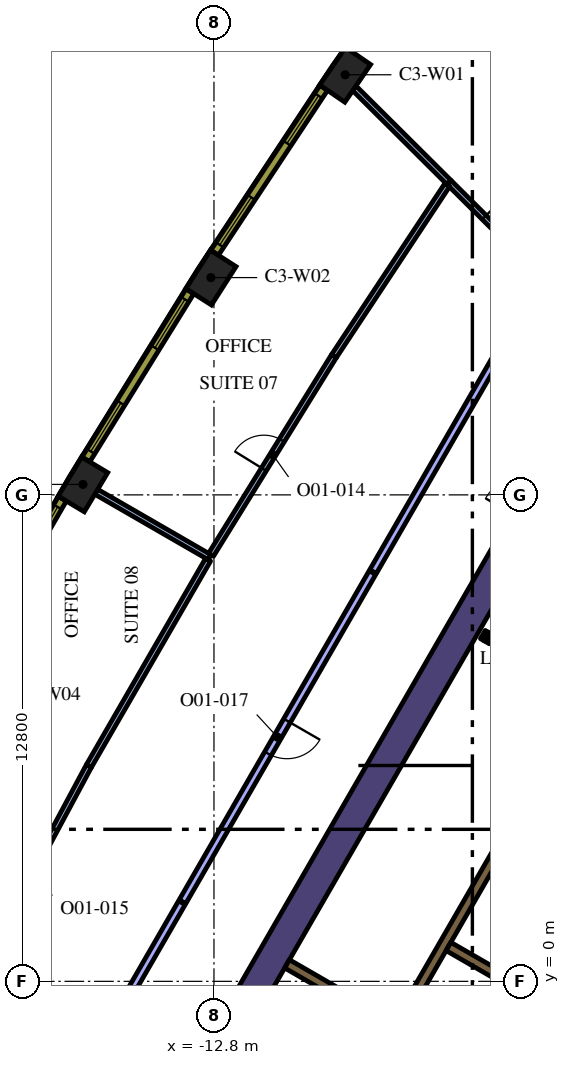
"""IFC4 building model, lengths in metres.
Left out: names, types, materials, properties, quantities, classifications, styles, units other than length and angle.
Written with IfcOpenShell. Run it as: python <this file> out.ifc"""

import sys

from ifc_helpers import new_model, si_unit, direction, frame, frame_2d, origin, origin_2d, place, context, subcontext, project, spatial, polyline, rectangle, outline, extrude, element, fill, save


model = new_model("IFC4")
c1 = context("Model", 3, precision=1e-05, world=origin(), true_north=direction((0.0, 1.0)))
c2 = subcontext(c1, "Body", "Model", "MODEL_VIEW")
j1 = project(units=[si_unit("LENGTHUNIT", "METRE"), si_unit("PLANEANGLEUNIT", "RADIAN")], contexts=[c1])
p1 = place(None, origin())
s1 = spatial("IfcSite", under=j1, at=p1, CompositionType="ELEMENT")
p2 = place(p1, origin())
s2 = spatial("IfcBuilding", under=s1, at=p2, CompositionType="ELEMENT")
p3 = place(p2, frame((0.0, 0.0, 141.6)))
s3 = spatial("IfcBuildingStorey", under=s2, at=p3, CompositionType="ELEMENT", Elevation=141.6)
for number, where, z_axis, x_axis in (
    (1, (-9.348, 23.854, 0.0), (0.0, 0.0, 1.0), (-0.565, -0.825, 0.0)),
    (2, (-12.88, 18.517, 0.0), (0.0, 0.0, 1.0), (-0.539, -0.842, 0.0)),
    (3, (-16.247, 13.075, 0.0), (0.0, 0.0, 1.0), (-0.513, -0.858, 0.0)),
):
    element("IfcColumn", number, at=place(p3, frame(where, z_axis=z_axis, x_axis=x_axis)), inside=s3, PredefinedType="COLUMN", context=c2, shape_type="SweptSolid", body=[
        extrude(rectangle(XDim=1.2, YDim=0.8, at=origin_2d()), origin(), (0.0, 0.0, 1.0), 4.2),
    ])
p4 = place(p3, frame((-12.668, -1.842, 0.0), z_axis=(0.0, 0.0, 1.0), x_axis=(0.500003640647, 0.866023301845, 0.0)))
e4 = element("IfcWall", 4, at=p4, inside=s3, PredefinedType="SOLIDWALL", context=c2, shape_type="SweptSolid", body=[
    extrude(rectangle(XDim=15.858, YDim=0.8, at=frame_2d((7.929, 0.0))), origin(), (0.0, 0.0, 1.0), 4.2),
])
p5 = place(p3, frame((-8.06, -1.311, 0.0), z_axis=(0.0, 0.0, 1.0), x_axis=(0.50000273126, 0.866023826885, 0.0)))
e5 = element("IfcWall", 5, at=p5, inside=s3, PredefinedType="SOLIDWALL", context=c2, shape_type="SweptSolid", body=[
    extrude(rectangle(XDim=10.33, YDim=0.25, at=frame_2d((5.165, 0.0))), origin(), (0.0, 0.0, 1.0), 4.2),
])
p6 = place(p3, frame((-4.724, -0.182, 0.0), z_axis=(0.0, 0.0, 1.0), x_axis=(-0.866008176907, 0.50002983664, 0.0)))
e6 = element("IfcWall", 6, at=p6, inside=s3, PredefinedType="SOLIDWALL", context=c2, shape_type="SweptSolid", body=[
    extrude(rectangle(XDim=2.2, YDim=0.25, at=frame_2d((1.1, 0.0))), origin(), (0.0, 0.0, 1.0), 4.2),
])
p7 = place(p3, frame((-8.106, -1.14, 0.0), z_axis=(0.0, 0.0, 1.0), x_axis=(-0.866008981251, 0.500028443584, 0.0)))
e7 = element("IfcWall", 7, at=p7, inside=s3, PredefinedType="SOLIDWALL", context=c2, shape_type="SweptSolid", body=[
    extrude(rectangle(XDim=3.2, YDim=0.25, at=frame_2d((1.6, 0.0))), origin(), (0.0, 0.0, 1.0), 4.2),
])
p8 = place(p3, frame((-5.725, 9.125, 0.0), z_axis=(0.0, 0.0, 1.0), x_axis=(0.866185586049, -0.49972245349, 0.0)))
e8 = element("IfcWall", 8, at=p8, inside=s3, PredefinedType="SOLIDWALL", context=c2, shape_type="SweptSolid", body=[
    extrude(rectangle(XDim=0.11, YDim=0.25, at=frame_2d((0.055, 0.0))), origin(), (0.0, 0.0, 1.0), 4.2),
])
p9 = place(p3, origin())
e9 = element("IfcWall", 9, at=p9, inside=s3, PredefinedType="SOLIDWALL", context=c2, shape_type="SweptSolid", body=[
    extrude(outline(polyline([(-5.689, 8.96), (-5.69, 8.961), (-5.565, 9.177), (-5.319, 9.035), (-5.335, 9.026), (-5.351, 9.015), (-5.366, 9.002), (-5.379, 8.988), (-5.392, 8.972), (-5.402, 8.956), (-5.412, 8.939), (-5.629, 9.064), (-5.629, 9.064), (-5.689, 8.96)])), origin(), (0.0, 0.0, 1.0), 4.2),
])
p10 = place(p3, frame((-0.898, 6.194, 0.0), z_axis=(0.0, 0.0, 1.0), x_axis=(-0.499996202215, -0.866027596426, 0.0)))
e10 = element("IfcWall", 10, at=p10, inside=s3, PredefinedType="SOLIDWALL", context=c2, shape_type="SweptSolid", body=[
    extrude(rectangle(XDim=9.83, YDim=0.25, at=frame_2d((4.915, 0.0))), origin(), (0.0, 0.0, 1.0), 4.2),
])
p11 = place(p10, frame((0.585, 0.0, 0.0)))
e11 = element("IfcOpeningElement", 11, at=p11, cuts=e10, PredefinedType="OPENING", context=c2, shape_type="SweptSolid", body=[
    extrude(rectangle(XDim=1.1, YDim=2.1, at=frame_2d((0.55, 1.05))), frame((0.0, 0.135, 0.0), z_axis=(0.0, -1.0, 0.0), x_axis=(1.0, 0.0, 0.0)), (0.0, 0.0, 1.0), 0.27),
])
p12 = place(p10, frame((3.105, 0.0, 0.0)))
e12 = element("IfcOpeningElement", 12, at=p12, cuts=e10, PredefinedType="OPENING", context=c2, shape_type="SweptSolid", body=[
    extrude(rectangle(XDim=1.1, YDim=2.1, at=frame_2d((0.55, 1.05))), frame((0.0, 0.135, 0.0), z_axis=(0.0, -1.0, 0.0), x_axis=(1.0, 0.0, 0.0)), (0.0, 0.0, 1.0), 0.27),
])
p13 = place(p10, frame((5.625, 0.0, 0.0)))
e13 = element("IfcOpeningElement", 13, at=p13, cuts=e10, PredefinedType="OPENING", context=c2, shape_type="SweptSolid", body=[
    extrude(rectangle(XDim=1.1, YDim=2.1, at=frame_2d((0.55, 1.05))), frame((0.0, 0.135, 0.0), z_axis=(0.0, -1.0, 0.0), x_axis=(1.0, 0.0, 0.0)), (0.0, 0.0, 1.0), 0.27),
])
p14 = place(p10, frame((8.145, 0.0, 0.0)))
e14 = element("IfcOpeningElement", 14, at=p14, cuts=e10, PredefinedType="OPENING", context=c2, shape_type="SweptSolid", body=[
    extrude(rectangle(XDim=1.1, YDim=2.1, at=frame_2d((0.55, 1.05))), frame((0.0, 0.135, 0.0), z_axis=(0.0, -1.0, 0.0), x_axis=(1.0, 0.0, 0.0)), (0.0, 0.0, 1.0), 0.27),
])
p15 = place(p3, frame((-5.659, 9.012, 0.0), z_axis=(0.0, 0.0, 1.0), x_axis=(0.866009402589, -0.500027713859, 0.0)))
e15 = element("IfcWall", 15, at=p15, inside=s3, PredefinedType="PARTITIONING", context=c2, shape_type="SweptSolid", body=[
    extrude(rectangle(XDim=2.1, YDim=0.12, at=frame_2d((1.05, 0.0))), origin(), (0.0, 0.0, 1.0), 3.15),
])
p16 = place(p15, frame((0.45, 0.0, 0.0)))
e16 = element("IfcOpeningElement", 16, at=p16, cuts=e15, PredefinedType="OPENING", context=c2, shape_type="SweptSolid", body=[
    extrude(rectangle(XDim=1.2, YDim=2.1, at=frame_2d((0.6, 1.05))), frame((0.0, 0.07, 0.0), z_axis=(0.0, -1.0, 0.0), x_axis=(1.0, 0.0, 0.0)), (0.0, 0.0, 1.0), 0.14),
])
p17 = place(p3, frame((-6.613, 21.021, 0.0), z_axis=(0.0, 0.0, 1.0), x_axis=(-0.709222036241, 0.704985179497, 0.0)))
e17 = element("IfcWall", 17, at=p17, inside=s3, PredefinedType="PARTITIONING", context=c2, shape_type="SweptSolid", body=[
    extrude(rectangle(XDim=3.515, YDim=0.15, at=frame_2d((1.757, 0.0))), origin(), (0.0, 0.0, 1.0), 3.15),
])
p18 = place(p3, frame((-6.619, 21.027, 0.0), z_axis=(0.0, 0.0, 1.0), x_axis=(0.709188943058, -0.705018470002, 0.0)))
e18 = element("IfcWall", 18, at=p18, inside=s3, PredefinedType="PARTITIONING", context=c2, shape_type="SweptSolid", body=[
    extrude(rectangle(XDim=3.512, YDim=0.15, at=frame_2d((1.756, 0.0))), origin(), (0.0, 0.0, 1.0), 3.15),
])
p19 = place(p18, frame((1.312, 0.0, 0.0)))
e19 = element("IfcOpeningElement", 19, at=p19, cuts=e18, PredefinedType="OPENING", context=c2, shape_type="SweptSolid", body=[
    extrude(rectangle(XDim=0.9, YDim=2.1, at=frame_2d((0.45, 1.05))), frame((0.0, 0.085, 0.0), z_axis=(0.0, -1.0, 0.0), x_axis=(1.0, 0.0, 0.0)), (0.0, 0.0, 1.0), 0.17),
])
p20 = place(p3, frame((-12.917, 11.16, 0.0), z_axis=(0.0, 0.0, 1.0), x_axis=(-0.866039125629, 0.499976232315, 0.0)))
e20 = element("IfcWall", 20, at=p20, inside=s3, PredefinedType="PARTITIONING", context=c2, shape_type="SweptSolid", body=[
    extrude(rectangle(XDim=3.442, YDim=0.15, at=frame_2d((1.721, 0.0))), origin(), (0.0, 0.0, 1.0), 3.15),
])
p21 = place(p3, frame((-6.658, 20.96, 0.0), z_axis=(0.0, 0.0, 1.0), x_axis=(-0.551907039463, -0.833905642019, 0.0)))
e21 = element("IfcWall", 21, at=p21, inside=s3, PredefinedType="PARTITIONING", context=c2, shape_type="SweptSolid", body=[
    extrude(rectangle(XDim=5.412, YDim=0.15, at=frame_2d((2.706, 0.0))), origin(), (0.0, 0.0, 1.0), 3.15),
])
p22 = place(p3, frame((-12.877, 11.224, 0.0), z_axis=(0.0, 0.0, 1.0), x_axis=(0.526202711334, 0.850359163286, 0.0)))
e22 = element("IfcWall", 22, at=p22, inside=s3, PredefinedType="PARTITIONING", context=c2, shape_type="SweptSolid", body=[
    extrude(rectangle(XDim=6.142, YDim=0.15, at=frame_2d((3.071, 0.0))), origin(), (0.0, 0.0, 1.0), 3.15),
])
p23 = place(p22, frame((2.642, 0.0, 0.0)))
e23 = element("IfcOpeningElement", 23, at=p23, cuts=e22, PredefinedType="OPENING", context=c2, shape_type="SweptSolid", body=[
    extrude(rectangle(XDim=0.9, YDim=2.1, at=frame_2d((0.45, 1.05))), frame((0.0, 0.085, 0.0), z_axis=(0.0, -1.0, 0.0), x_axis=(1.0, 0.0, 0.0)), (0.0, 0.0, 1.0), 0.17),
])
p24 = place(p3, frame((-12.954, 11.095, 0.0), z_axis=(0.0, 0.0, 1.0), x_axis=(-0.500282785331, -0.865862076027, 0.0)))
e24 = element("IfcWall", 24, at=p24, inside=s3, PredefinedType="PARTITIONING", context=c2, shape_type="SweptSolid", body=[
    extrude(rectangle(XDim=6.273, YDim=0.15, at=frame_2d((3.136, 0.0))), origin(), (0.0, 0.0, 1.0), 3.15),
])
p25 = place(p3, frame((-19.118, 0.02, 0.0), z_axis=(0.0, 0.0, 1.0), x_axis=(0.47251230182, 0.88132407469, 0.0)))
e25 = element("IfcWall", 25, at=p25, inside=s3, PredefinedType="PARTITIONING", context=c2, shape_type="SweptSolid", body=[
    extrude(rectangle(XDim=6.404, YDim=0.15, at=frame_2d((3.202, 0.0))), origin(), (0.0, 0.0, 1.0), 3.15),
])
p26 = place(p25, frame((2.704, 0.0, 0.0)))
e26 = element("IfcOpeningElement", 26, at=p26, cuts=e25, PredefinedType="OPENING", context=c2, shape_type="SweptSolid", body=[
    extrude(rectangle(XDim=0.9, YDim=2.1, at=frame_2d((0.45, 1.05))), frame((0.0, 0.085, 0.0), z_axis=(0.0, -1.0, 0.0), x_axis=(1.0, 0.0, 0.0)), (0.0, 0.0, 1.0), 0.17),
])
p27 = place(p3, frame((-8.628, 10.755, 0.0), z_axis=(0.0, 0.0, 1.0), x_axis=(-0.500004234368, -0.866022959057, 0.0)))
e27 = element("IfcWall", 27, at=p27, inside=s3, PredefinedType="PARTITIONING", context=c2, shape_type="SweptSolid", body=[
    extrude(rectangle(XDim=10.0, YDim=0.2, at=frame_2d((5.0, 0.0))), origin(), (0.0, 0.0, 1.0), 3.15),
])
p28 = place(p27, frame((4.5, 0.0, 0.0)))
e28 = element("IfcOpeningElement", 28, at=p28, cuts=e27, PredefinedType="OPENING", context=c2, shape_type="SweptSolid", body=[
    extrude(rectangle(XDim=1.0, YDim=2.1, at=frame_2d((0.5, 1.05))), frame((0.0, 0.11, 0.0), z_axis=(0.0, -1.0, 0.0), x_axis=(1.0, 0.0, 0.0)), (0.0, 0.0, 1.0), 0.22),
])
p29 = place(p3, frame((-13.643, 2.069, 0.0), z_axis=(0.0, 0.0, 1.0), x_axis=(-0.500012305324, -0.866018299186, 0.0)))
e29 = element("IfcWall", 29, at=p29, inside=s3, PredefinedType="PARTITIONING", context=c2, shape_type="SweptSolid", body=[
    extrude(rectangle(XDim=9.721, YDim=0.2, at=frame_2d((4.861, 0.0))), origin(), (0.0, 0.0, 1.0), 3.15),
])
p30 = place(p3, frame((-4.167, 18.483, 0.0), z_axis=(0.0, 0.0, 1.0), x_axis=(-0.499974340325, -0.866040217898, 0.0)))
e30 = element("IfcWall", 30, at=p30, inside=s3, PredefinedType="PARTITIONING", context=c2, shape_type="SweptSolid", body=[
    extrude(rectangle(XDim=8.894, YDim=0.2, at=frame_2d((4.447, 0.0))), origin(), (0.0, 0.0, 1.0), 3.15),
])
p31 = place(p3, frame((-6.223, 28.762, 0.0), z_axis=(0.0, 0.0, 1.0), x_axis=(-0.577115207679, -0.816662743772, 0.0)))
e31 = element("IfcWall", 31, at=p31, inside=s3, PredefinedType="SOLIDWALL", context=c2, shape_type="SweptSolid", body=[
    extrude(rectangle(XDim=5.213, YDim=0.24, at=frame_2d((2.606, 0.0))), origin(), (0.0, 0.0, 1.0), 3.95),
])
p32 = place(p31, frame((0.221, 0.0, 0.9)))
e32 = element("IfcOpeningElement", 32, at=p32, cuts=e31, PredefinedType="OPENING", context=c2, shape_type="SweptSolid", body=[
    extrude(rectangle(XDim=1.5, YDim=2.55, at=frame_2d((0.75, 1.275))), frame((0.0, 0.13, 0.0), z_axis=(0.0, -1.0, 0.0), x_axis=(1.0, 0.0, 0.0)), (0.0, 0.0, 1.0), 0.26),
])
p33 = place(p31, frame((3.452, 0.0, 0.9)))
e33 = element("IfcOpeningElement", 33, at=p33, cuts=e31, PredefinedType="OPENING", context=c2, shape_type="SweptSolid", body=[
    extrude(rectangle(XDim=1.5, YDim=2.55, at=frame_2d((0.75, 1.275))), frame((0.0, 0.13, 0.0), z_axis=(0.0, -1.0, 0.0), x_axis=(1.0, 0.0, 0.0)), (0.0, 0.0, 1.0), 0.26),
])
p34 = place(p3, frame((-9.911, 23.51, 0.0), z_axis=(0.0, 0.0, 1.0), x_axis=(-0.551892811511, -0.833915058386, 0.0)))
e34 = element("IfcWall", 34, at=p34, inside=s3, PredefinedType="SOLIDWALL", context=c2, shape_type="SweptSolid", body=[
    extrude(rectangle(XDim=5.204, YDim=0.24, at=frame_2d((2.602, 0.0))), origin(), (0.0, 0.0, 1.0), 3.95),
])
p35 = place(p34, frame((0.248, 0.0, 0.9)))
e35 = element("IfcOpeningElement", 35, at=p35, cuts=e34, PredefinedType="OPENING", context=c2, shape_type="SweptSolid", body=[
    extrude(rectangle(XDim=1.5, YDim=2.55, at=frame_2d((0.75, 1.275))), frame((0.0, 0.13, 0.0), z_axis=(0.0, -1.0, 0.0), x_axis=(1.0, 0.0, 0.0)), (0.0, 0.0, 1.0), 0.26),
])
p36 = place(p34, frame((3.455, 0.0, 0.9)))
e36 = element("IfcOpeningElement", 36, at=p36, cuts=e34, PredefinedType="OPENING", context=c2, shape_type="SweptSolid", body=[
    extrude(rectangle(XDim=1.5, YDim=2.55, at=frame_2d((0.75, 1.275))), frame((0.0, 0.13, 0.0), z_axis=(0.0, -1.0, 0.0), x_axis=(1.0, 0.0, 0.0)), (0.0, 0.0, 1.0), 0.26),
])
p37 = place(p3, frame((-13.433, 18.156, 0.0), z_axis=(0.0, 0.0, 1.0), x_axis=(-0.526197926587, -0.850362124072, 0.0)))
e37 = element("IfcWall", 37, at=p37, inside=s3, PredefinedType="SOLIDWALL", context=c2, shape_type="SweptSolid", body=[
    extrude(rectangle(XDim=5.203, YDim=0.24, at=frame_2d((2.602, 0.0))), origin(), (0.0, 0.0, 1.0), 3.95),
])
p38 = place(p37, frame((0.248, 0.0, 0.9)))
e38 = element("IfcOpeningElement", 38, at=p38, cuts=e37, PredefinedType="OPENING", context=c2, shape_type="SweptSolid", body=[
    extrude(rectangle(XDim=1.5, YDim=2.55, at=frame_2d((0.75, 1.275))), frame((0.0, 0.13, 0.0), z_axis=(0.0, -1.0, 0.0), x_axis=(1.0, 0.0, 0.0)), (0.0, 0.0, 1.0), 0.26),
])
p39 = place(p37, frame((3.455, 0.0, 0.9)))
e39 = element("IfcOpeningElement", 39, at=p39, cuts=e37, PredefinedType="OPENING", context=c2, shape_type="SweptSolid", body=[
    extrude(rectangle(XDim=1.5, YDim=2.55, at=frame_2d((0.75, 1.275))), frame((0.0, 0.13, 0.0), z_axis=(0.0, -1.0, 0.0), x_axis=(1.0, 0.0, 0.0)), (0.0, 0.0, 1.0), 0.26),
])
p40 = place(p3, frame((-16.789, 12.697, 0.0), z_axis=(0.0, 0.0, 1.0), x_axis=(-0.500009456303, -0.866019944116, 0.0)))
e40 = element("IfcWall", 40, at=p40, inside=s3, PredefinedType="SOLIDWALL", context=c2, shape_type="SweptSolid", body=[
    extrude(rectangle(XDim=5.204, YDim=0.24, at=frame_2d((2.602, 0.0))), origin(), (0.0, 0.0, 1.0), 3.95),
])
p41 = place(p40, frame((0.248, 0.0, 0.9)))
e41 = element("IfcOpeningElement", 41, at=p41, cuts=e40, PredefinedType="OPENING", context=c2, shape_type="SweptSolid", body=[
    extrude(rectangle(XDim=1.5, YDim=2.55, at=frame_2d((0.75, 1.275))), frame((0.0, 0.13, 0.0), z_axis=(0.0, -1.0, 0.0), x_axis=(1.0, 0.0, 0.0)), (0.0, 0.0, 1.0), 0.26),
])
p42 = place(p40, frame((3.455, 0.0, 0.9)))
e42 = element("IfcOpeningElement", 42, at=p42, cuts=e40, PredefinedType="OPENING", context=c2, shape_type="SweptSolid", body=[
    extrude(rectangle(XDim=1.5, YDim=2.55, at=frame_2d((0.75, 1.275))), frame((0.0, 0.13, 0.0), z_axis=(0.0, -1.0, 0.0), x_axis=(1.0, 0.0, 0.0)), (0.0, 0.0, 1.0), 0.26),
])
p43 = place(p19, origin())
e43 = element("IfcDoor", 43, at=p43, inside=s3, OperationType="SINGLE_SWING_RIGHT", PredefinedType="DOOR", context=c2, shape_type="SweptSolid", body=[
    extrude(rectangle(XDim=0.9, YDim=2.1, at=frame_2d((0.45, 1.05))), frame((0.0, 0.025, 0.0), z_axis=(0.0, -1.0, 0.0), x_axis=(1.0, 0.0, 0.0)), (0.0, 0.0, 1.0), 0.05),
])
fill(e19, e43)
p44 = place(p23, origin())
e44 = element("IfcDoor", 44, at=p44, inside=s3, OperationType="SINGLE_SWING_RIGHT", PredefinedType="DOOR", context=c2, shape_type="SweptSolid", body=[
    extrude(rectangle(XDim=0.9, YDim=2.1, at=frame_2d((0.45, 1.05))), frame((0.0, 0.025, 0.0), z_axis=(0.0, -1.0, 0.0), x_axis=(1.0, 0.0, 0.0)), (0.0, 0.0, 1.0), 0.05),
])
fill(e23, e44)
p45 = place(p28, origin())
e45 = element("IfcDoor", 45, at=p45, inside=s3, OperationType="SINGLE_SWING_LEFT", PredefinedType="DOOR", context=c2, shape_type="SweptSolid", body=[
    extrude(rectangle(XDim=1.0, YDim=2.1, at=frame_2d((0.5, 1.05))), frame((0.0, 0.025, 0.0), z_axis=(0.0, -1.0, 0.0), x_axis=(1.0, 0.0, 0.0)), (0.0, 0.0, 1.0), 0.05),
])
fill(e28, e45)
p46 = place(p35, origin())
e46 = element("IfcWindow", 46, at=p46, inside=s3, PartitioningType="SINGLE_PANEL", PredefinedType="WINDOW", context=c2, shape_type="SweptSolid", body=[
    extrude(rectangle(XDim=1.5, YDim=2.55, at=frame_2d((0.75, 1.275))), frame((0.0, 0.04, 0.0), z_axis=(0.0, -1.0, 0.0), x_axis=(1.0, 0.0, 0.0)), (0.0, 0.0, 1.0), 0.06),
])
fill(e35, e46)
p47 = place(p36, origin())
e47 = element("IfcWindow", 47, at=p47, inside=s3, PartitioningType="SINGLE_PANEL", PredefinedType="WINDOW", context=c2, shape_type="SweptSolid", body=[
    extrude(rectangle(XDim=1.5, YDim=2.55, at=frame_2d((0.75, 1.275))), frame((0.0, 0.04, 0.0), z_axis=(0.0, -1.0, 0.0), x_axis=(1.0, 0.0, 0.0)), (0.0, 0.0, 1.0), 0.06),
])
fill(e36, e47)
p48 = place(p38, origin())
e48 = element("IfcWindow", 48, at=p48, inside=s3, PartitioningType="SINGLE_PANEL", PredefinedType="WINDOW", context=c2, shape_type="SweptSolid", body=[
    extrude(rectangle(XDim=1.5, YDim=2.55, at=frame_2d((0.75, 1.275))), frame((0.0, 0.04, 0.0), z_axis=(0.0, -1.0, 0.0), x_axis=(1.0, 0.0, 0.0)), (0.0, 0.0, 1.0), 0.06),
])
fill(e38, e48)
p49 = place(p39, origin())
e49 = element("IfcWindow", 49, at=p49, inside=s3, PartitioningType="SINGLE_PANEL", PredefinedType="WINDOW", context=c2, shape_type="SweptSolid", body=[
    extrude(rectangle(XDim=1.5, YDim=2.55, at=frame_2d((0.75, 1.275))), frame((0.0, 0.04, 0.0), z_axis=(0.0, -1.0, 0.0), x_axis=(1.0, 0.0, 0.0)), (0.0, 0.0, 1.0), 0.06),
])
fill(e39, e49)
p50 = place(p41, origin())
e50 = element("IfcWindow", 50, at=p50, inside=s3, PartitioningType="SINGLE_PANEL", PredefinedType="WINDOW", context=c2, shape_type="SweptSolid", body=[
    extrude(rectangle(XDim=1.5, YDim=2.55, at=frame_2d((0.75, 1.275))), frame((0.0, 0.04, 0.0), z_axis=(0.0, -1.0, 0.0), x_axis=(1.0, 0.0, 0.0)), (0.0, 0.0, 1.0), 0.06),
])
fill(e41, e50)
save(model, sys.argv[1])
